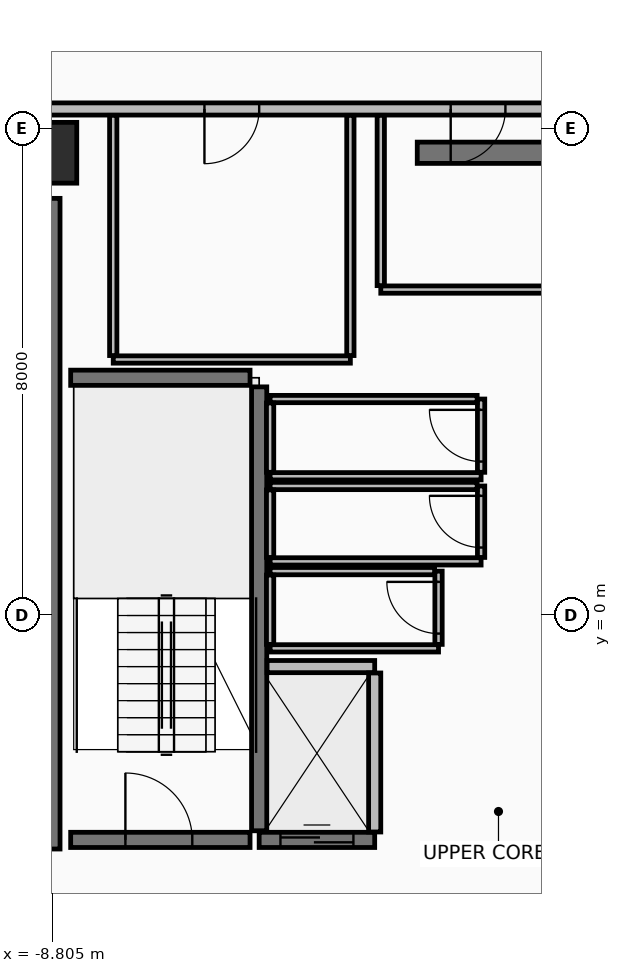
"""IFC4 building model, lengths in metres.
Left out: names, types, materials, properties, quantities, classifications, styles, units other than length and angle.
Written with IfcOpenShell. Run it as: python <this file> out.ifc"""

import sys

from ifc_helpers import new_model, si_unit, direction, frame, frame_2d, origin, origin_2d, place, context, subcontext, project, spatial, rectangle, extrude, element, fill, save


model = new_model("IFC4")
c1 = context("Model", 3, precision=1e-05, world=origin(), true_north=direction((0.0, 1.0)))
c2 = subcontext(c1, "Body", "Model", "MODEL_VIEW")
j1 = project(units=[si_unit("LENGTHUNIT", "METRE"), si_unit("PLANEANGLEUNIT", "RADIAN")], contexts=[c1])
p1 = place(None, origin())
s1 = spatial("IfcSite", under=j1, at=p1, CompositionType="ELEMENT")
p2 = place(p1, origin())
s2 = spatial("IfcBuilding", under=s1, at=p2, CompositionType="ELEMENT")
p3 = place(p2, frame((0.0, 0.0, 241.45)))
s3 = spatial("IfcBuildingStorey", under=s2, at=p3, CompositionType="ELEMENT", Elevation=241.45)
p4 = place(p3, frame((-8.9, 7.6, 0.0), z_axis=(0.0, 0.0, 1.0), x_axis=(1.0, 0.0, 0.0)))
e1 = element("IfcColumn", 1, at=p4, inside=s3, PredefinedType="COLUMN", context=c2, shape_type="SweptSolid", body=[
    extrude(rectangle(XDim=1.0, YDim=1.0, at=origin_2d()), origin(), (0.0, 0.0, 1.0), 3.6),
])
p5 = place(p3, frame((-2.8, 7.6, 0.0), z_axis=(0.0, 0.0, 1.0), x_axis=(1.0, 0.0, 0.0)))
e2 = element("IfcWall", 2, at=p5, inside=s3, PredefinedType="SHEAR", context=c2, shape_type="SweptSolid", body=[
    extrude(rectangle(XDim=5.38, YDim=0.35, at=frame_2d((2.69, 0.0))), origin(), (0.0, 0.0, 1.0), 3.42),
])
p6 = place(p3, frame((-8.9, -3.85, 0.0), z_axis=(0.0, 0.0, 1.0), x_axis=(0.0, 1.0, 0.0)))
e3 = element("IfcWall", 3, at=p6, inside=s3, PredefinedType="SHEAR", context=c2, shape_type="SweptSolid", body=[
    extrude(rectangle(XDim=10.7, YDim=0.45, at=frame_2d((5.35, 0.0))), origin(), (0.0, 0.0, 1.0), 3.42),
])
p7 = place(p3, frame((9.62, 8.32, 0.0), z_axis=(0.0, 0.0, 1.0), x_axis=(-1.0, 0.0, 0.0)))
e4 = element("IfcWall", 4, at=p7, inside=s3, PredefinedType="PARTITIONING", context=c2, shape_type="SweptSolid", body=[
    extrude(rectangle(XDim=19.24, YDim=0.2, at=frame_2d((9.62, 0.0))), origin(), (0.0, 0.0, 1.0), 2.915),
])
p8 = place(p7, frame((10.97, 0.0, 0.0)))
e5 = element("IfcOpeningElement", 5, at=p8, cuts=e4, PredefinedType="OPENING", context=c2, shape_type="SweptSolid", body=[
    extrude(rectangle(XDim=0.9, YDim=2.1, at=frame_2d((0.45, 1.05))), frame((0.0, 0.11, 0.0), z_axis=(0.0, -1.0, 0.0), x_axis=(1.0, 0.0, 0.0)), (0.0, 0.0, 1.0), 0.22),
])
p9 = place(p7, frame((7.57, 0.0, 0.0)))
e6 = element("IfcOpeningElement", 6, at=p9, cuts=e4, PredefinedType="OPENING", context=c2, shape_type="SweptSolid", body=[
    extrude(rectangle(XDim=0.9, YDim=2.1, at=frame_2d((0.45, 1.05))), frame((0.0, 0.11, 0.0), z_axis=(0.0, -1.0, 0.0), x_axis=(1.0, 0.0, 0.0)), (0.0, 0.0, 1.0), 0.22),
])
p10 = place(p7, frame((15.02, 0.0, 0.0)))
e7 = element("IfcOpeningElement", 7, at=p10, cuts=e4, PredefinedType="OPENING", context=c2, shape_type="SweptSolid", body=[
    extrude(rectangle(XDim=0.9, YDim=2.1, at=frame_2d((0.45, 1.05))), frame((0.0, 0.11, 0.0), z_axis=(0.0, -1.0, 0.0), x_axis=(1.0, 0.0, 0.0)), (0.0, 0.0, 1.0), 0.22),
])
p11 = place(p3, frame((-5.4, -3.55, 0.0), z_axis=(0.0, 0.0, 1.0), x_axis=(0.0, 1.0, 0.0)))
e8 = element("IfcWall", 8, at=p11, inside=s3, PredefinedType="SHEAR", context=c2, shape_type="SweptSolid", body=[
    extrude(rectangle(XDim=7.3, YDim=0.25, at=frame_2d((3.65, 0.0))), origin(), (0.0, 0.0, 1.0), 3.42),
])
p12 = place(p3, frame((-8.5, -3.7, 0.0), z_axis=(0.0, 0.0, 1.0), x_axis=(1.0, 0.0, 0.0)))
e9 = element("IfcWall", 9, at=p12, inside=s3, PredefinedType="SHEAR", context=c2, shape_type="SweptSolid", body=[
    extrude(rectangle(XDim=2.95, YDim=0.25, at=frame_2d((1.475, 0.0))), origin(), (0.0, 0.0, 1.0), 3.42),
])
p13 = place(p12, frame((0.9, 0.0, 0.0)))
e10 = element("IfcOpeningElement", 10, at=p13, cuts=e9, PredefinedType="OPENING", context=c2, shape_type="SweptSolid", body=[
    extrude(rectangle(XDim=1.1, YDim=2.15, at=frame_2d((0.55, 1.075))), frame((0.0, 0.135, 0.0), z_axis=(0.0, -1.0, 0.0), x_axis=(1.0, 0.0, 0.0)), (0.0, 0.0, 1.0), 0.27),
])
p14 = place(p3, frame((-8.5, 3.9, 0.0), z_axis=(0.0, 0.0, 1.0), x_axis=(1.0, 0.0, 0.0)))
e11 = element("IfcWall", 11, at=p14, inside=s3, PredefinedType="SHEAR", context=c2, shape_type="SweptSolid", body=[
    extrude(rectangle(XDim=2.95, YDim=0.25, at=frame_2d((1.475, 0.0))), origin(), (0.0, 0.0, 1.0), 3.42),
])
p15 = place(p3, frame((-5.4, -3.7, 0.0), z_axis=(0.0, 0.0, 1.0), x_axis=(1.0, 0.0, 0.0)))
e12 = element("IfcWall", 12, at=p15, inside=s3, PredefinedType="SHEAR", context=c2, shape_type="SweptSolid", body=[
    extrude(rectangle(XDim=1.9, YDim=0.25, at=frame_2d((0.95, 0.0))), origin(), (0.0, 0.0, 1.0), 3.42),
])
p16 = place(p15, frame((0.35, 0.0, 0.0)))
e13 = element("IfcOpeningElement", 13, at=p16, cuts=e12, PredefinedType="OPENING", context=c2, shape_type="SweptSolid", body=[
    extrude(rectangle(XDim=1.2, YDim=2.2, at=frame_2d((0.6, 1.1))), frame((0.0, 0.135, 0.0), z_axis=(0.0, -1.0, 0.0), x_axis=(1.0, 0.0, 0.0)), (0.0, 0.0, 1.0), 0.27),
])
p17 = place(p3, frame((-5.27, -0.85, 0.0), z_axis=(0.0, 0.0, 1.0), x_axis=(1.0, 0.0, 0.0)))
e14 = element("IfcWall", 14, at=p17, inside=s3, PredefinedType="PARTITIONING", context=c2, shape_type="SweptSolid", body=[
    extrude(rectangle(XDim=1.77, YDim=0.2, at=frame_2d((0.885, 0.0))), origin(), (0.0, 0.0, 1.0), 3.42),
])
p18 = place(p3, frame((-3.5, -3.57, 0.0), z_axis=(0.0, 0.0, 1.0), x_axis=(0.0, 1.0, 0.0)))
e15 = element("IfcWall", 15, at=p18, inside=s3, PredefinedType="PARTITIONING", context=c2, shape_type="SweptSolid", body=[
    extrude(rectangle(XDim=2.615, YDim=0.2, at=frame_2d((1.308, 0.0))), origin(), (0.0, 0.0, 1.0), 3.42),
])
p19 = place(p3, frame((-5.22, 2.28, 0.0), z_axis=(0.0, 0.0, 1.0), x_axis=(1.0, 0.0, 0.0)))
e16 = element("IfcWall", 16, at=p19, inside=s3, PredefinedType="PARTITIONING", context=c2, shape_type="SweptSolid", body=[
    extrude(rectangle(XDim=3.47, YDim=0.12, at=frame_2d((1.735, 0.0))), origin(), (0.0, 0.0, 1.0), 3.42),
])
p20 = place(p3, frame((-1.75, 2.345, 0.0), z_axis=(0.0, 0.0, 1.0), x_axis=(0.0, 1.0, 0.0)))
e17 = element("IfcWall", 17, at=p20, inside=s3, PredefinedType="PARTITIONING", context=c2, shape_type="SweptSolid", body=[
    extrude(rectangle(XDim=1.205, YDim=0.12, at=frame_2d((0.603, 0.0))), origin(), (0.0, 0.0, 1.0), 3.42),
])
p21 = place(p20, frame((0.177, 0.0, 0.0)))
e18 = element("IfcOpeningElement", 18, at=p21, cuts=e17, PredefinedType="OPENING", context=c2, shape_type="SweptSolid", body=[
    extrude(rectangle(XDim=0.85, YDim=2.1, at=frame_2d((0.425, 1.05))), frame((0.0, 0.07, 0.0), z_axis=(0.0, -1.0, 0.0), x_axis=(1.0, 0.0, 0.0)), (0.0, 0.0, 1.0), 0.14),
])
p22 = place(p3, frame((-1.815, 3.55, 0.0), z_axis=(0.0, 0.0, 1.0), x_axis=(-1.0, 0.0, 0.0)))
e19 = element("IfcWall", 19, at=p22, inside=s3, PredefinedType="PARTITIONING", context=c2, shape_type="SweptSolid", body=[
    extrude(rectangle(XDim=3.405, YDim=0.12, at=frame_2d((1.703, 0.0))), origin(), (0.0, 0.0, 1.0), 3.42),
])
p23 = place(p3, frame((-5.22, 3.485, 0.0), z_axis=(0.0, 0.0, 1.0), x_axis=(0.0, -1.0, 0.0)))
e20 = element("IfcWall", 20, at=p23, inside=s3, PredefinedType="PARTITIONING", context=c2, shape_type="SweptSolid", body=[
    extrude(rectangle(XDim=1.14, YDim=0.12, at=frame_2d((0.57, 0.0))), origin(), (0.0, 0.0, 1.0), 3.42),
])
p24 = place(p3, frame((-5.22, 0.88, 0.0), z_axis=(0.0, 0.0, 1.0), x_axis=(1.0, 0.0, 0.0)))
e21 = element("IfcWall", 21, at=p24, inside=s3, PredefinedType="PARTITIONING", context=c2, shape_type="SweptSolid", body=[
    extrude(rectangle(XDim=3.47, YDim=0.12, at=frame_2d((1.735, 0.0))), origin(), (0.0, 0.0, 1.0), 3.42),
])
p25 = place(p3, frame((-1.75, 0.945, 0.0), z_axis=(0.0, 0.0, 1.0), x_axis=(0.0, 1.0, 0.0)))
e22 = element("IfcWall", 22, at=p25, inside=s3, PredefinedType="PARTITIONING", context=c2, shape_type="SweptSolid", body=[
    extrude(rectangle(XDim=1.175, YDim=0.12, at=frame_2d((0.587, 0.0))), origin(), (0.0, 0.0, 1.0), 3.42),
])
p26 = place(p25, frame((0.163, 0.0, 0.0)))
e23 = element("IfcOpeningElement", 23, at=p26, cuts=e22, PredefinedType="OPENING", context=c2, shape_type="SweptSolid", body=[
    extrude(rectangle(XDim=0.85, YDim=2.1, at=frame_2d((0.425, 1.05))), frame((0.0, 0.07, 0.0), z_axis=(0.0, -1.0, 0.0), x_axis=(1.0, 0.0, 0.0)), (0.0, 0.0, 1.0), 0.14),
])
p27 = place(p3, frame((-1.815, 2.12, 0.0), z_axis=(0.0, 0.0, 1.0), x_axis=(-1.0, 0.0, 0.0)))
e24 = element("IfcWall", 24, at=p27, inside=s3, PredefinedType="PARTITIONING", context=c2, shape_type="SweptSolid", body=[
    extrude(rectangle(XDim=3.405, YDim=0.12, at=frame_2d((1.703, 0.0))), origin(), (0.0, 0.0, 1.0), 3.42),
])
p28 = place(p3, frame((-5.22, 2.055, 0.0), z_axis=(0.0, 0.0, 1.0), x_axis=(0.0, -1.0, 0.0)))
e25 = element("IfcWall", 25, at=p28, inside=s3, PredefinedType="PARTITIONING", context=c2, shape_type="SweptSolid", body=[
    extrude(rectangle(XDim=1.11, YDim=0.12, at=frame_2d((0.555, 0.0))), origin(), (0.0, 0.0, 1.0), 3.42),
])
p29 = place(p3, frame((-5.22, -0.55, 0.0), z_axis=(0.0, 0.0, 1.0), x_axis=(1.0, 0.0, 0.0)))
e26 = element("IfcWall", 26, at=p29, inside=s3, PredefinedType="PARTITIONING", context=c2, shape_type="SweptSolid", body=[
    extrude(rectangle(XDim=2.77, YDim=0.12, at=frame_2d((1.385, 0.0))), origin(), (0.0, 0.0, 1.0), 3.42),
])
p30 = place(p3, frame((-2.45, -0.485, 0.0), z_axis=(0.0, 0.0, 1.0), x_axis=(0.0, 1.0, 0.0)))
e27 = element("IfcWall", 27, at=p30, inside=s3, PredefinedType="PARTITIONING", context=c2, shape_type="SweptSolid", body=[
    extrude(rectangle(XDim=1.205, YDim=0.12, at=frame_2d((0.603, 0.0))), origin(), (0.0, 0.0, 1.0), 3.42),
])
p31 = place(p30, frame((0.178, 0.0, 0.0)))
e28 = element("IfcOpeningElement", 28, at=p31, cuts=e27, PredefinedType="OPENING", context=c2, shape_type="SweptSolid", body=[
    extrude(rectangle(XDim=0.85, YDim=2.1, at=frame_2d((0.425, 1.05))), frame((0.0, 0.07, 0.0), z_axis=(0.0, -1.0, 0.0), x_axis=(1.0, 0.0, 0.0)), (0.0, 0.0, 1.0), 0.14),
])
p32 = place(p3, frame((-2.515, 0.72, 0.0), z_axis=(0.0, 0.0, 1.0), x_axis=(-1.0, 0.0, 0.0)))
e29 = element("IfcWall", 29, at=p32, inside=s3, PredefinedType="PARTITIONING", context=c2, shape_type="SweptSolid", body=[
    extrude(rectangle(XDim=2.705, YDim=0.12, at=frame_2d((1.353, 0.0))), origin(), (0.0, 0.0, 1.0), 3.42),
])
p33 = place(p3, frame((-5.22, 0.655, 0.0), z_axis=(0.0, 0.0, 1.0), x_axis=(0.0, -1.0, 0.0)))
e30 = element("IfcWall", 30, at=p33, inside=s3, PredefinedType="PARTITIONING", context=c2, shape_type="SweptSolid", body=[
    extrude(rectangle(XDim=1.14, YDim=0.12, at=frame_2d((0.57, 0.0))), origin(), (0.0, 0.0, 1.0), 3.42),
])
p34 = place(p3, frame((-3.4, 5.35, 0.0), z_axis=(0.0, 0.0, 1.0), x_axis=(1.0, 0.0, 0.0)))
e31 = element("IfcWall", 31, at=p34, inside=s3, PredefinedType="PARTITIONING", context=c2, shape_type="SweptSolid", body=[
    extrude(rectangle(XDim=3.2, YDim=0.12, at=frame_2d((1.6, 0.0))), origin(), (0.0, 0.0, 1.0), 3.42),
])
p35 = place(p3, frame((-3.4, 8.215, 0.0), z_axis=(0.0, 0.0, 1.0), x_axis=(0.0, -1.0, 0.0)))
e32 = element("IfcWall", 32, at=p35, inside=s3, PredefinedType="PARTITIONING", context=c2, shape_type="SweptSolid", body=[
    extrude(rectangle(XDim=2.8, YDim=0.12, at=frame_2d((1.4, 0.0))), origin(), (0.0, 0.0, 1.0), 2.715),
])
p36 = place(p3, frame((-7.8, 4.2, 0.0), z_axis=(0.0, 0.0, 1.0), x_axis=(1.0, 0.0, 0.0)))
e33 = element("IfcWall", 33, at=p36, inside=s3, PredefinedType="PARTITIONING", context=c2, shape_type="SweptSolid", body=[
    extrude(rectangle(XDim=3.9, YDim=0.12, at=frame_2d((1.95, 0.0))), origin(), (0.0, 0.0, 1.0), 3.42),
])
for number, where, z_axis, x_axis in (
    (34, (-3.9, 4.265, 0.0), (0.0, 0.0, 1.0), (0.0, 1.0, 0.0)),
    (35, (-7.8, 8.215, 0.0), (0.0, 0.0, 1.0), (0.0, -1.0, 0.0)),
):
    element("IfcWall", number, at=place(p3, frame(where, z_axis=z_axis, x_axis=x_axis)), inside=s3, PredefinedType="PARTITIONING", context=c2, shape_type="SweptSolid", body=[
        extrude(rectangle(XDim=3.95, YDim=0.12, at=frame_2d((1.975, 0.0))), origin(), (0.0, 0.0, 1.0), 2.715),
    ])
p37 = place(p13, origin())
e36 = element("IfcDoor", 36, at=p37, inside=s3, OperationType="SINGLE_SWING_LEFT", PredefinedType="DOOR", context=c2, shape_type="SweptSolid", body=[
    extrude(rectangle(XDim=1.1, YDim=2.15, at=frame_2d((0.55, 1.075))), frame((0.0, 0.025, 0.0), z_axis=(0.0, -1.0, 0.0), x_axis=(1.0, 0.0, 0.0)), (0.0, 0.0, 1.0), 0.05),
])
fill(e10, e36)
p38 = place(p16, origin())
e37 = element("IfcDoor", 37, at=p38, inside=s3, OperationType="SLIDING_TO_RIGHT", PredefinedType="DOOR", context=c2, shape_type="SweptSolid", body=[
    extrude(rectangle(XDim=1.2, YDim=2.2, at=frame_2d((0.6, 1.1))), frame((0.0, 0.025, 0.0), z_axis=(0.0, -1.0, 0.0), x_axis=(1.0, 0.0, 0.0)), (0.0, 0.0, 1.0), 0.05),
])
fill(e13, e37)
p39 = place(p21, frame((0.85, 0.0, 0.0), z_axis=(0.0, 0.0, 1.0), x_axis=(-1.0, 0.0, 0.0)))
e38 = element("IfcDoor", 38, at=p39, inside=s3, OperationType="SINGLE_SWING_RIGHT", PredefinedType="DOOR", context=c2, shape_type="SweptSolid", body=[
    extrude(rectangle(XDim=0.85, YDim=2.1, at=frame_2d((0.425, 1.05))), frame((0.0, 0.025, 0.0), z_axis=(0.0, -1.0, 0.0), x_axis=(1.0, 0.0, 0.0)), (0.0, 0.0, 1.0), 0.05),
])
fill(e18, e38)
p40 = place(p26, frame((0.85, 0.0, 0.0), z_axis=(0.0, 0.0, 1.0), x_axis=(-1.0, 0.0, 0.0)))
e39 = element("IfcDoor", 39, at=p40, inside=s3, OperationType="SINGLE_SWING_RIGHT", PredefinedType="DOOR", context=c2, shape_type="SweptSolid", body=[
    extrude(rectangle(XDim=0.85, YDim=2.1, at=frame_2d((0.425, 1.05))), frame((0.0, 0.025, 0.0), z_axis=(0.0, -1.0, 0.0), x_axis=(1.0, 0.0, 0.0)), (0.0, 0.0, 1.0), 0.05),
])
fill(e23, e39)
p41 = place(p31, frame((0.85, 0.0, 0.0), z_axis=(0.0, 0.0, 1.0), x_axis=(-1.0, 0.0, 0.0)))
e40 = element("IfcDoor", 40, at=p41, inside=s3, OperationType="SINGLE_SWING_RIGHT", PredefinedType="DOOR", context=c2, shape_type="SweptSolid", body=[
    extrude(rectangle(XDim=0.85, YDim=2.1, at=frame_2d((0.425, 1.05))), frame((0.0, 0.025, 0.0), z_axis=(0.0, -1.0, 0.0), x_axis=(1.0, 0.0, 0.0)), (0.0, 0.0, 1.0), 0.05),
])
fill(e28, e40)
p42 = place(p8, frame((0.9, 0.0, 0.0), z_axis=(0.0, 0.0, 1.0), x_axis=(-1.0, 0.0, 0.0)))
e41 = element("IfcDoor", 41, at=p42, inside=s3, OperationType="SINGLE_SWING_LEFT", PredefinedType="DOOR", context=c2, shape_type="SweptSolid", body=[
    extrude(rectangle(XDim=0.9, YDim=2.1, at=frame_2d((0.45, 1.05))), frame((0.0, 0.025, 0.0), z_axis=(0.0, -1.0, 0.0), x_axis=(1.0, 0.0, 0.0)), (0.0, 0.0, 1.0), 0.05),
])
fill(e5, e41)
p43 = place(p10, frame((0.9, 0.0, 0.0), z_axis=(0.0, 0.0, 1.0), x_axis=(-1.0, 0.0, 0.0)))
e42 = element("IfcDoor", 42, at=p43, inside=s3, OperationType="SINGLE_SWING_LEFT", PredefinedType="DOOR", context=c2, shape_type="SweptSolid", body=[
    extrude(rectangle(XDim=0.9, YDim=2.1, at=frame_2d((0.45, 1.05))), frame((0.0, 0.025, 0.0), z_axis=(0.0, -1.0, 0.0), x_axis=(1.0, 0.0, 0.0)), (0.0, 0.0, 1.0), 0.05),
])
fill(e7, e42)
save(model, sys.argv[1])
